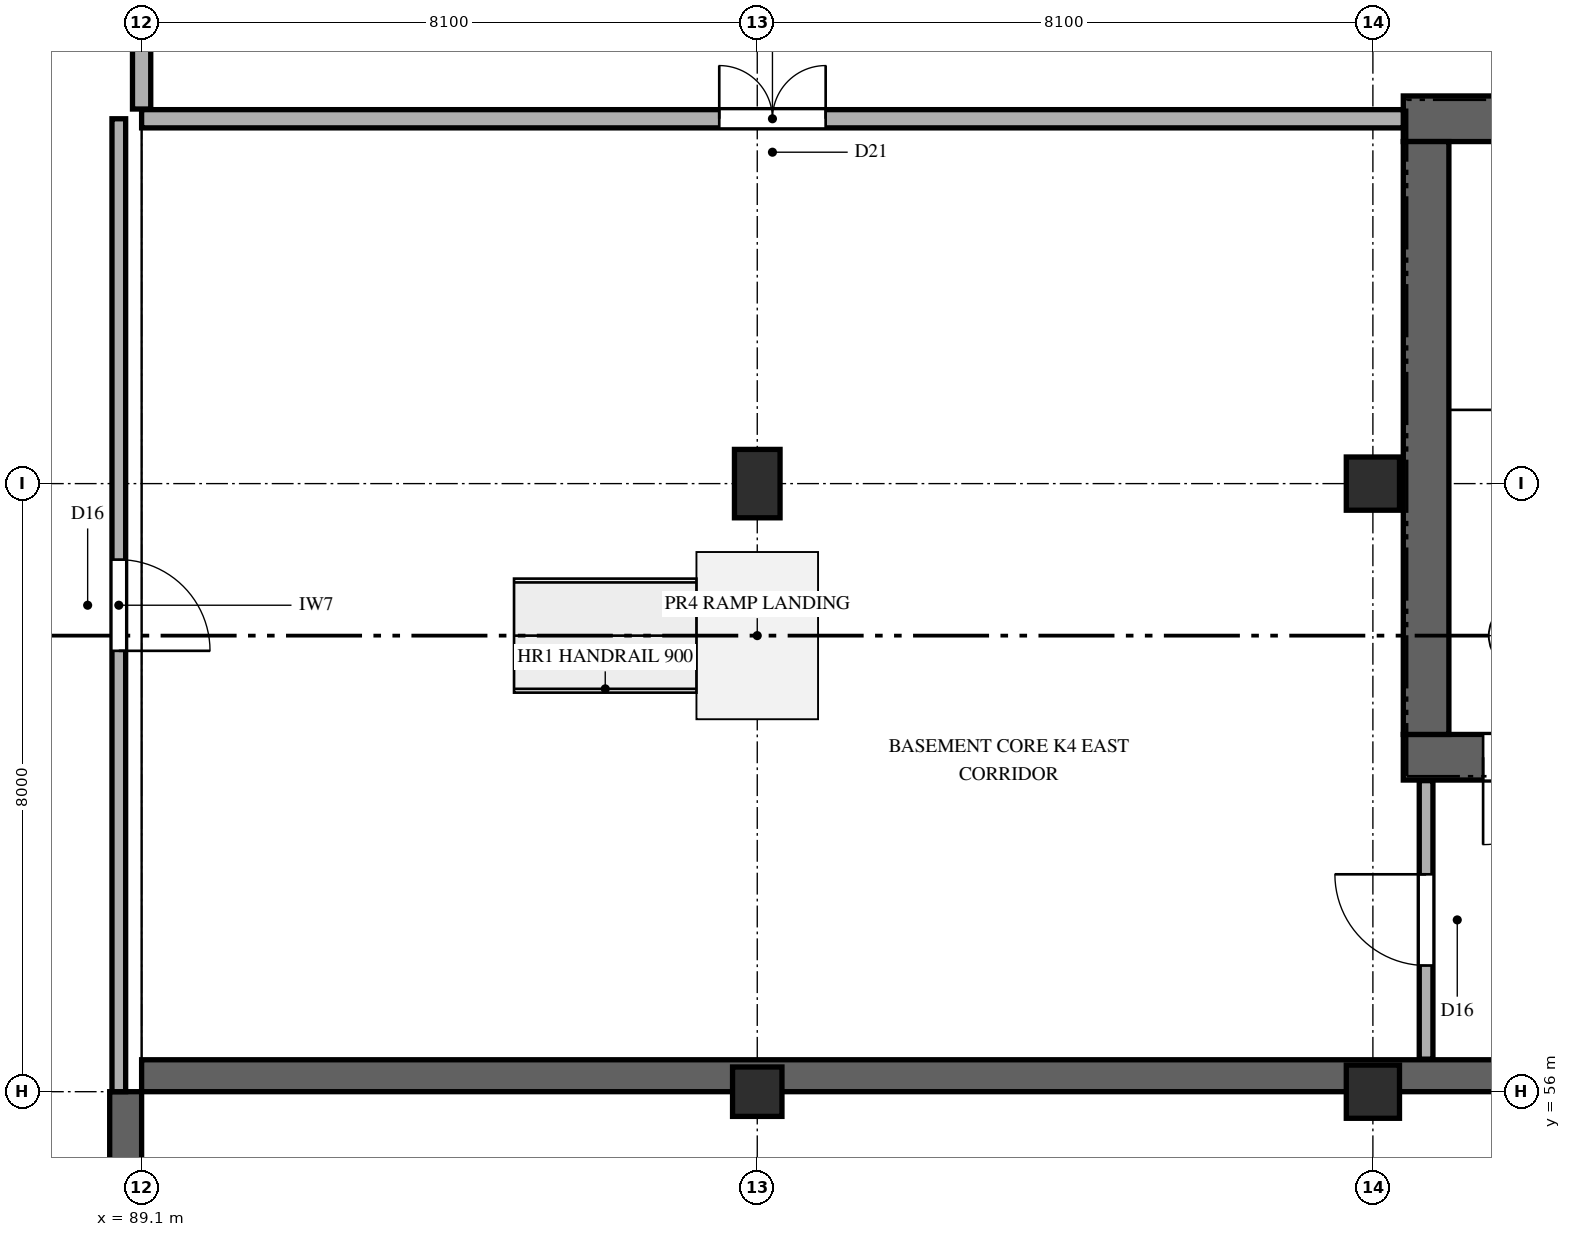
"""IFC4 building model, lengths in metres.
Left out: names, types, materials, properties, quantities, classifications, styles, units other than length and angle.
Written with IfcOpenShell. Run it as: python <this file> out.ifc"""

import sys

from ifc_helpers import new_model, si_unit, direction, frame, frame_2d, origin, origin_2d, place, context, subcontext, project, spatial, rectangle, extrude, element, fill, save


model = new_model("IFC4")
c1 = context("Model", 3, precision=1e-05, world=origin(), true_north=direction((0.0, 1.0)))
c2 = subcontext(c1, "Body", "Model", "MODEL_VIEW")
j1 = project(units=[si_unit("LENGTHUNIT", "METRE"), si_unit("PLANEANGLEUNIT", "RADIAN")], contexts=[c1])
p1 = place(None, origin())
s1 = spatial("IfcSite", under=j1, at=p1, CompositionType="ELEMENT")
p2 = place(p1, origin())
s2 = spatial("IfcBuilding", under=s1, at=p2, CompositionType="ELEMENT")
p3 = place(p2, frame((0.0, 0.0, -4.8)))
s3 = spatial("IfcBuildingStorey", under=s2, at=p3, CompositionType="ELEMENT", Elevation=-4.8)
p4 = place(p3, frame((126.79, 56.21, 0.0), z_axis=(0.0, 0.0, 1.0), x_axis=(-1.0, 0.0, 0.0)))
e1 = element("IfcWall", 1, at=p4, inside=s3, PredefinedType="USERDEFINED", context=c2, shape_type="SweptSolid", body=[
    extrude(rectangle(XDim=37.69, YDim=0.42, at=frame_2d((18.845, 0.0))), origin(), (0.0, 0.0, 1.0), 4.45),
])
p5 = place(p3, frame((88.89, 56.0, 0.0), z_axis=(0.0, 0.0, 1.0), x_axis=(0.0, -1.0, 0.0)))
e2 = element("IfcWall", 2, at=p5, inside=s3, PredefinedType="USERDEFINED", context=c2, shape_type="SweptSolid", body=[
    extrude(rectangle(XDim=31.79, YDim=0.42, at=frame_2d((15.895, 0.0))), origin(), (0.0, 0.0, 1.0), 4.45),
])
p6 = place(p3, frame((105.7, 60.4, 0.0), z_axis=(0.0, 0.0, 1.0), x_axis=(1.0, 0.0, 0.0)))
e3 = element("IfcWall", 3, at=p6, inside=s3, PredefinedType="SHEAR", context=c2, shape_type="SweptSolid", body=[
    extrude(rectangle(XDim=12.8, YDim=0.6, at=frame_2d((6.4, 0.0))), origin(), (0.0, 0.0, 1.0), 4.8),
])
p7 = place(p6, frame((1.05, 0.0, 0.0)))
e4 = element("IfcOpeningElement", 4, at=p7, cuts=e3, PredefinedType="OPENING", context=c2, shape_type="SweptSolid", body=[
    extrude(rectangle(XDim=1.15, YDim=2.25, at=frame_2d((0.575, 1.125))), frame((0.0, 0.31, 0.0), z_axis=(0.0, -1.0, 0.0), x_axis=(1.0, 0.0, 0.0)), (0.0, 0.0, 1.0), 0.62),
])
p8 = place(p6, frame((10.255, 0.0, 0.0)))
e5 = element("IfcOpeningElement", 5, at=p8, cuts=e3, PredefinedType="OPENING", context=c2, shape_type="SweptSolid", body=[
    extrude(rectangle(XDim=1.3, YDim=2.3, at=frame_2d((0.65, 1.15))), frame((0.0, 0.31, 0.0), z_axis=(0.0, -1.0, 0.0), x_axis=(1.0, 0.0, 0.0)), (0.0, 0.0, 1.0), 0.62),
])
p9 = place(p3, frame((105.7, 68.8, 0.0), z_axis=(0.0, 0.0, 1.0), x_axis=(1.0, 0.0, 0.0)))
e6 = element("IfcWall", 6, at=p9, inside=s3, PredefinedType="SHEAR", context=c2, shape_type="SweptSolid", body=[
    extrude(rectangle(XDim=12.8, YDim=0.6, at=frame_2d((6.4, 0.0))), origin(), (0.0, 0.0, 1.0), 4.8),
])
p10 = place(p3, frame((106.0, 60.7, 0.0), z_axis=(0.0, 0.0, 1.0), x_axis=(0.0, 1.0, 0.0)))
e7 = element("IfcWall", 7, at=p10, inside=s3, PredefinedType="SHEAR", context=c2, shape_type="SweptSolid", body=[
    extrude(rectangle(XDim=7.8, YDim=0.6, at=frame_2d((3.9, 0.0))), origin(), (0.0, 0.0, 1.0), 4.8),
])
p11 = place(p3, frame((97.2, 56.0, 0.0), z_axis=(0.0, 0.0, 1.0), x_axis=(1.0, 0.0, 0.0)))
e8 = element("IfcColumn", 8, at=p11, inside=s3, PredefinedType="COLUMN", context=c2, shape_type="SweptSolid", body=[
    extrude(rectangle(XDim=0.65, YDim=0.65, at=origin_2d()), origin(), (0.0, 0.0, 1.0), 4.8),
])
p12 = place(p3, frame((97.2, 64.0, 0.0), z_axis=(0.0, 0.0, 1.0), x_axis=(1.0, 0.0, 0.0)))
e9 = element("IfcColumn", 9, at=p12, inside=s3, PredefinedType="COLUMN", context=c2, shape_type="SweptSolid", body=[
    extrude(rectangle(XDim=0.6, YDim=0.9, at=origin_2d()), origin(), (0.0, 0.0, 1.0), 4.8),
])
for number, where, z_axis, x_axis in (
    (10, (105.3, 56.0, 0.0), (0.0, 0.0, 1.0), (1.0, 0.0, 0.0)),
    (11, (105.3, 64.0, 0.0), (0.0, 0.0, 1.0), (1.0, 0.0, 0.0)),
):
    element("IfcColumn", number, at=place(p3, frame(where, z_axis=z_axis, x_axis=x_axis)), inside=s3, PredefinedType="COLUMN", context=c2, shape_type="SweptSolid", body=[
        extrude(rectangle(XDim=0.7, YDim=0.7, at=origin_2d()), origin(), (0.0, 0.0, 1.0), 4.8),
    ])
p13 = place(p3, frame((89.1, 68.8, 0.0), z_axis=(0.0, 0.0, 1.0), x_axis=(1.0, 0.0, 0.0)))
e12 = element("IfcWall", 12, at=p13, inside=s3, PredefinedType="PARTITIONING", context=c2, shape_type="SweptSolid", body=[
    extrude(rectangle(XDim=16.6, YDim=0.24, at=frame_2d((8.3, 0.0))), origin(), (0.0, 0.0, 1.0), 4.45),
])
p14 = place(p13, frame((7.6, 0.0, 0.0)))
e13 = element("IfcOpeningElement", 13, at=p14, cuts=e12, PredefinedType="OPENING", context=c2, shape_type="SweptSolid", body=[
    extrude(rectangle(XDim=1.4, YDim=2.35, at=frame_2d((0.7, 1.175))), frame((0.0, 0.13, 0.0), z_axis=(0.0, -1.0, 0.0), x_axis=(1.0, 0.0, 0.0)), (0.0, 0.0, 1.0), 0.26),
])
p15 = place(p3, frame((88.8, 56.0, 0.0), z_axis=(0.0, 0.0, 1.0), x_axis=(0.0, 1.0, 0.0)))
e14 = element("IfcWall", 14, at=p15, inside=s3, PredefinedType="PARTITIONING", context=c2, shape_type="SweptSolid", body=[
    extrude(rectangle(XDim=12.8, YDim=0.18, at=frame_2d((6.4, 0.0))), origin(), (0.0, 0.0, 1.0), 4.45),
])
p16 = place(p15, frame((5.8, 0.0, 0.0)))
e15 = element("IfcOpeningElement", 15, at=p16, cuts=e14, PredefinedType="OPENING", context=c2, shape_type="SweptSolid", body=[
    extrude(rectangle(XDim=1.2, YDim=2.2, at=frame_2d((0.6, 1.1))), frame((0.0, 0.1, 0.0), z_axis=(0.0, -1.0, 0.0), x_axis=(1.0, 0.0, 0.0)), (0.0, 0.0, 1.0), 0.2),
])
p17 = place(p3, frame((89.1, 68.928, 0.0), z_axis=(0.0, 0.0, 1.0), x_axis=(0.0, 1.0, 0.0)))
e16 = element("IfcWall", 16, at=p17, inside=s3, PredefinedType="PARTITIONING", context=c2, shape_type="SweptSolid", body=[
    extrude(rectangle(XDim=5.972, YDim=0.24, at=frame_2d((2.986, 0.0))), origin(), (0.0, 0.0, 1.0), 4.45),
])
p18 = place(p3, frame((106.0, 56.428, 0.0), z_axis=(0.0, 0.0, 1.0), x_axis=(0.0, 1.0, 0.0)))
e17 = element("IfcWall", 17, at=p18, inside=s3, PredefinedType="PARTITIONING", context=c2, shape_type="SweptSolid", body=[
    extrude(rectangle(XDim=3.664, YDim=0.18, at=frame_2d((1.832, 0.0))), origin(), (0.0, 0.0, 1.0), 4.45),
])
p19 = place(p18, frame((1.232, 0.0, 0.0)))
e18 = element("IfcOpeningElement", 18, at=p19, cuts=e17, PredefinedType="OPENING", context=c2, shape_type="SweptSolid", body=[
    extrude(rectangle(XDim=1.2, YDim=2.2, at=frame_2d((0.6, 1.1))), frame((0.0, 0.1, 0.0), z_axis=(0.0, -1.0, 0.0), x_axis=(1.0, 0.0, 0.0)), (0.0, 0.0, 1.0), 0.2),
])
p20 = place(p7, frame((1.15, 0.0, 0.0), z_axis=(0.0, 0.0, 1.0), x_axis=(-1.0, 0.0, 0.0)))
e19 = element("IfcDoor", 19, at=p20, inside=s3, OperationType="SINGLE_SWING_LEFT", PredefinedType="DOOR", context=c2, shape_type="SweptSolid", body=[
    extrude(rectangle(XDim=1.15, YDim=2.25, at=frame_2d((0.575, 1.125))), frame((0.0, 0.025, 0.0), z_axis=(0.0, -1.0, 0.0), x_axis=(1.0, 0.0, 0.0)), (0.0, 0.0, 1.0), 0.05),
])
fill(e4, e19)
p21 = place(p14, origin())
e20 = element("IfcDoor", 20, at=p21, inside=s3, OperationType="DOUBLE_DOOR_SINGLE_SWING", PredefinedType="DOOR", context=c2, shape_type="SweptSolid", body=[
    extrude(rectangle(XDim=1.4, YDim=2.35, at=frame_2d((0.7, 1.175))), frame((0.0, 0.025, 0.0), z_axis=(0.0, -1.0, 0.0), x_axis=(1.0, 0.0, 0.0)), (0.0, 0.0, 1.0), 0.05),
])
fill(e13, e20)
p22 = place(p16, frame((1.2, 0.0, 0.0), z_axis=(0.0, 0.0, 1.0), x_axis=(-1.0, 0.0, 0.0)))
e21 = element("IfcDoor", 21, at=p22, inside=s3, OperationType="SINGLE_SWING_LEFT", PredefinedType="DOOR", context=c2, shape_type="SweptSolid", body=[
    extrude(rectangle(XDim=1.2, YDim=2.2, at=frame_2d((0.6, 1.1))), frame((0.0, 0.025, 0.0), z_axis=(0.0, -1.0, 0.0), x_axis=(1.0, 0.0, 0.0)), (0.0, 0.0, 1.0), 0.05),
])
fill(e15, e21)
p23 = place(p19, origin())
e22 = element("IfcDoor", 22, at=p23, inside=s3, OperationType="SINGLE_SWING_RIGHT", PredefinedType="DOOR", context=c2, shape_type="SweptSolid", body=[
    extrude(rectangle(XDim=1.2, YDim=2.2, at=frame_2d((0.6, 1.1))), frame((0.0, 0.025, 0.0), z_axis=(0.0, -1.0, 0.0), x_axis=(1.0, 0.0, 0.0)), (0.0, 0.0, 1.0), 0.05),
])
fill(e18, e22)
save(model, sys.argv[1])
